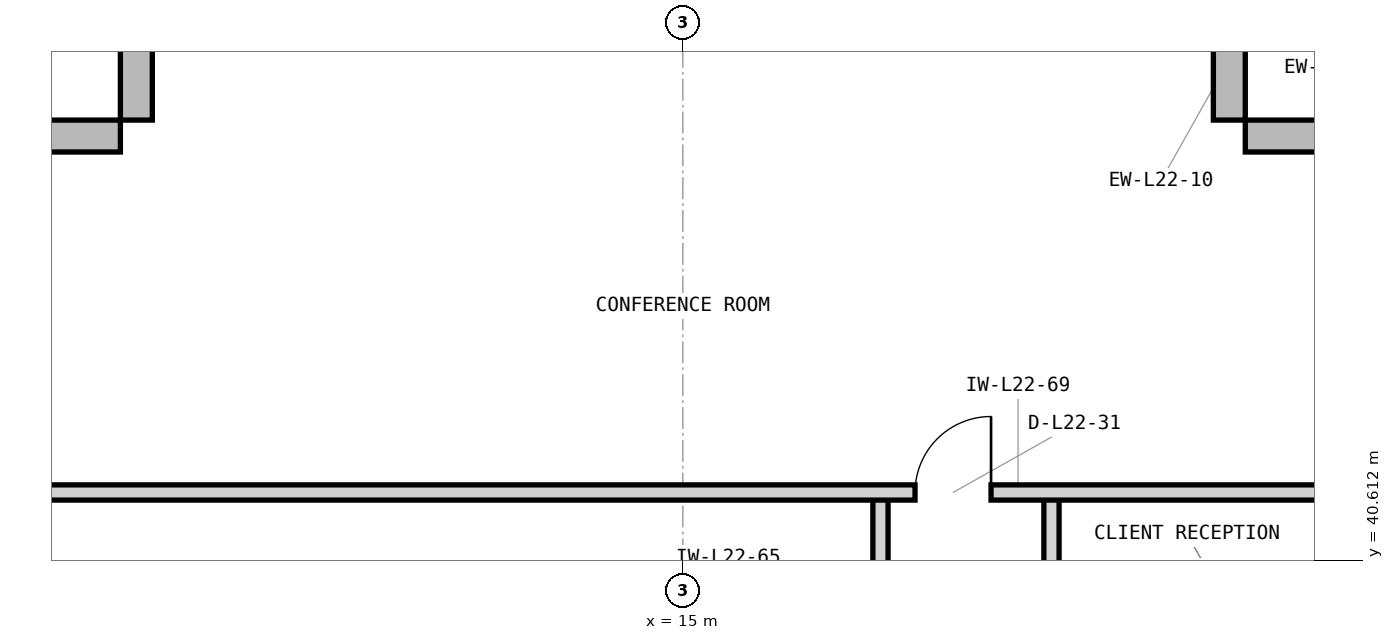
"""IFC4 building model, lengths in metres.
Left out: names, types, materials, properties, quantities, classifications, styles, units other than length and angle.
Written with IfcOpenShell. Run it as: python <this file> out.ifc"""

import sys

from ifc_helpers import new_model, si_unit, direction, frame, frame_2d, origin, place, context, subcontext, project, spatial, rectangle, extrude, element, fill, save


model = new_model("IFC4")
c1 = context("Model", 3, precision=1e-05, world=origin(), true_north=direction((0.0, 1.0)))
c2 = subcontext(c1, "Body", "Model", "MODEL_VIEW")
j1 = project(units=[si_unit("LENGTHUNIT", "METRE"), si_unit("PLANEANGLEUNIT", "RADIAN")], contexts=[c1])
p1 = place(None, origin())
s1 = spatial("IfcSite", under=j1, at=p1, CompositionType="ELEMENT")
p2 = place(p1, origin())
s2 = spatial("IfcBuilding", under=s1, at=p2, CompositionType="ELEMENT")
p3 = place(p2, frame((0.0, 0.0, 97.2)))
s3 = spatial("IfcBuildingStorey", under=s2, at=p3, CompositionType="ELEMENT", Elevation=97.2)
for number, where, z_axis, x_axis in (
    (1, (24.0, 46.19, 0.0), (0.0, 0.0, 1.0), (-1.0, 0.0, 0.0)),
    (2, (22.19, 46.4, 0.0), (0.0, 0.0, 1.0), (0.0, 1.0, 0.0)),
    (3, (7.81, 48.0, 0.0), (0.0, 0.0, 1.0), (0.0, -1.0, 0.0)),
    (4, (7.6, 46.19, 0.0), (0.0, 0.0, 1.0), (-1.0, 0.0, 0.0)),
):
    element("IfcWall", number, at=place(p3, frame(where, z_axis=z_axis, x_axis=x_axis)), inside=s3, PredefinedType="STANDARD", context=c2, shape_type="SweptSolid", body=[
        extrude(rectangle(XDim=1.6, YDim=0.42, at=frame_2d((0.8, 0.0))), origin(), (0.0, 0.0, 1.0), 3.7),
    ])
p4 = place(p3, frame((17.6, 38.18, 0.0), z_axis=(0.0, 0.0, 1.0), x_axis=(0.0, 1.0, 0.0)))
e5 = element("IfcWall", 5, at=p4, inside=s3, PredefinedType="PARTITIONING", context=c2, shape_type="SweptSolid", body=[
    extrude(rectangle(XDim=3.32, YDim=0.2, at=frame_2d((1.66, 0.0))), origin(), (0.0, 0.0, 1.0), 3.69),
])
p5 = place(p4, frame((1.16, 0.0, 0.0)))
e6 = element("IfcOpeningElement", 6, at=p5, cuts=e5, PredefinedType="OPENING", context=c2, shape_type="SweptSolid", body=[
    extrude(rectangle(XDim=1.0, YDim=2.15, at=frame_2d((0.5, 1.075))), frame((0.0, 0.11, 0.0), z_axis=(0.0, -1.0, 0.0), x_axis=(1.0, 0.0, 0.0)), (0.0, 0.0, 1.0), 0.22),
])
p6 = place(p3, frame((19.85, 38.18, 0.0), z_axis=(0.0, 0.0, 1.0), x_axis=(0.0, 1.0, 0.0)))
e7 = element("IfcWall", 7, at=p6, inside=s3, PredefinedType="PARTITIONING", context=c2, shape_type="SweptSolid", body=[
    extrude(rectangle(XDim=3.32, YDim=0.2, at=frame_2d((1.66, 0.0))), origin(), (0.0, 0.0, 1.0), 3.69),
])
p7 = place(p6, frame((1.16, 0.0, 0.0)))
e8 = element("IfcOpeningElement", 8, at=p7, cuts=e7, PredefinedType="OPENING", context=c2, shape_type="SweptSolid", body=[
    extrude(rectangle(XDim=1.0, YDim=2.15, at=frame_2d((0.5, 1.075))), frame((0.0, 0.11, 0.0), z_axis=(0.0, -1.0, 0.0), x_axis=(1.0, 0.0, 0.0)), (0.0, 0.0, 1.0), 0.22),
])
p8 = place(p3, frame((6.18, 41.5, 0.0), z_axis=(0.0, 0.0, 1.0), x_axis=(1.0, 0.0, 0.0)))
e9 = element("IfcWall", 9, at=p8, inside=s3, PredefinedType="PARTITIONING", context=c2, shape_type="SweptSolid", body=[
    extrude(rectangle(XDim=17.64, YDim=0.2, at=frame_2d((8.82, 0.0))), origin(), (0.0, 0.0, 1.0), 3.69),
])
p9 = place(p8, frame((11.875, 0.0, 0.0)))
e10 = element("IfcOpeningElement", 10, at=p9, cuts=e9, PredefinedType="OPENING", context=c2, shape_type="SweptSolid", body=[
    extrude(rectangle(XDim=1.0, YDim=2.15, at=frame_2d((0.5, 1.075))), frame((0.0, 0.11, 0.0), z_axis=(0.0, -1.0, 0.0), x_axis=(1.0, 0.0, 0.0)), (0.0, 0.0, 1.0), 0.22),
])
p10 = place(p9, origin())
e11 = element("IfcDoor", 11, at=p10, inside=s3, OperationType="SINGLE_SWING_RIGHT", PredefinedType="DOOR", context=c2, shape_type="SweptSolid", body=[
    extrude(rectangle(XDim=1.0, YDim=2.15, at=frame_2d((0.5, 1.075))), frame((0.0, 0.025, 0.0), z_axis=(0.0, -1.0, 0.0), x_axis=(1.0, 0.0, 0.0)), (0.0, 0.0, 1.0), 0.05),
])
fill(e10, e11)
save(model, sys.argv[1])
